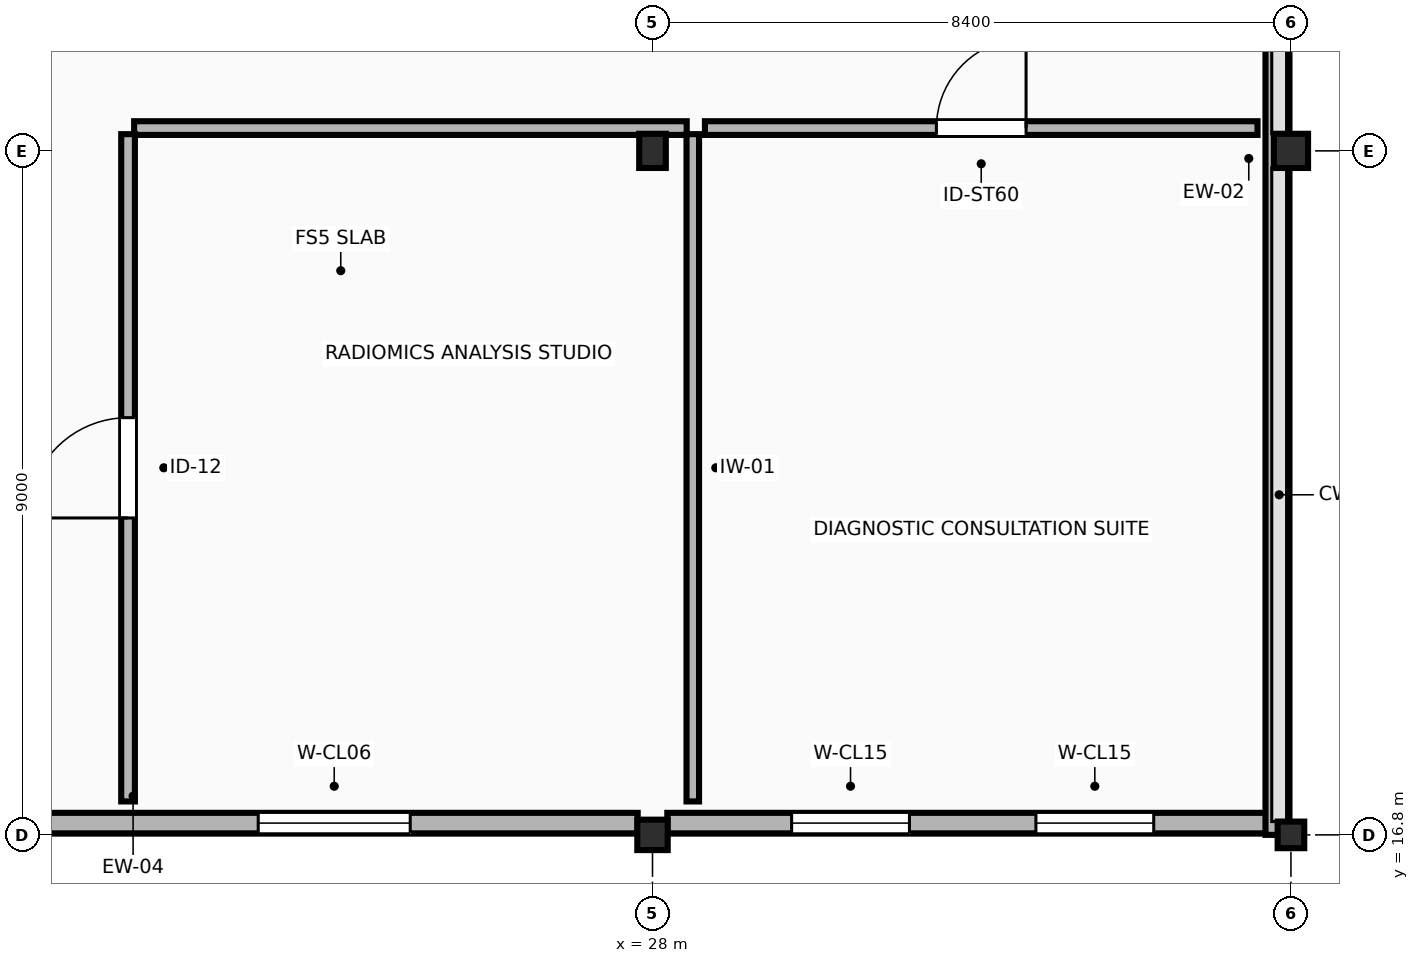
"""IFC4 building model, lengths in metres.
Left out: names, types, materials, properties, quantities, classifications, styles, units other than length and angle.
Written with IfcOpenShell. Run it as: python <this file> out.ifc"""

import sys

from ifc_helpers import new_model, si_unit, direction, frame, frame_2d, origin, origin_2d, place, context, subcontext, project, spatial, polyline, rectangle, outline, extrude, element, fill, save


model = new_model("IFC4")
c1 = context("Model", 3, precision=1e-05, world=origin(), true_north=direction((0.0, 1.0)))
c2 = subcontext(c1, "Body", "Model", "MODEL_VIEW")
j1 = project(units=[si_unit("LENGTHUNIT", "METRE"), si_unit("PLANEANGLEUNIT", "RADIAN")], contexts=[c1])
p1 = place(None, origin())
s1 = spatial("IfcSite", under=j1, at=p1, CompositionType="ELEMENT")
p2 = place(p1, origin())
s2 = spatial("IfcBuilding", under=s1, at=p2, CompositionType="ELEMENT")
p3 = place(p2, frame((0.0, 0.0, 22.2)))
s3 = spatial("IfcBuildingStorey", under=s2, at=p3, CompositionType="ELEMENT", Elevation=22.2)
p4 = place(p3, frame((28.0, 16.8, 0.0), z_axis=(0.0, 0.0, 1.0), x_axis=(1.0, 0.0, 0.0)))
e1 = element("IfcColumn", 1, at=p4, inside=s3, PredefinedType="COLUMN", context=c2, shape_type="SweptSolid", body=[
    extrude(rectangle(XDim=0.4, YDim=0.4, at=origin_2d()), origin(), (0.0, 0.0, 1.0), 4.2),
])
p5 = place(p3, frame((28.0, 25.8, 0.0), z_axis=(0.0, 0.0, 1.0), x_axis=(1.0, 0.0, 0.0)))
e2 = element("IfcColumn", 2, at=p5, inside=s3, PredefinedType="COLUMN", context=c2, shape_type="SweptSolid", body=[
    extrude(rectangle(XDim=0.35, YDim=0.45, at=origin_2d()), origin(), (0.0, 0.0, 1.0), 4.2),
])
p6 = place(p3, frame((36.4, 16.8, 0.0), z_axis=(0.0, 0.0, 1.0), x_axis=(1.0, 0.0, 0.0)))
e3 = element("IfcColumn", 3, at=p6, inside=s3, PredefinedType="COLUMN", context=c2, shape_type="SweptSolid", body=[
    extrude(rectangle(XDim=0.35, YDim=0.35, at=origin_2d()), origin(), (0.0, 0.0, 1.0), 4.2),
])
p7 = place(p3, frame((36.4, 25.8, 0.0), z_axis=(0.0, 0.0, 1.0), x_axis=(1.0, 0.0, 0.0)))
e4 = element("IfcColumn", 4, at=p7, inside=s3, PredefinedType="COLUMN", context=c2, shape_type="SweptSolid", body=[
    extrude(rectangle(XDim=0.45, YDim=0.45, at=origin_2d()), origin(), (0.0, 0.0, 1.0), 4.2),
])
p8 = place(p3, frame((19.82, 16.955, 0.0), z_axis=(0.0, 0.0, 1.0), x_axis=(1.0, 0.0, 0.0)))
e5 = element("IfcWall", 5, at=p8, inside=s3, PredefinedType="STANDARD", context=c2, shape_type="SweptSolid", body=[
    extrude(rectangle(XDim=7.985, YDim=0.27, at=frame_2d((3.992, 0.0))), origin(), (0.0, 0.0, 1.0), 3.92),
])
p9 = place(p8, frame((2.992, 0.0, 0.95)))
e6 = element("IfcOpeningElement", 6, at=p9, cuts=e5, PredefinedType="OPENING", context=c2, shape_type="SweptSolid", body=[
    extrude(rectangle(XDim=2.0, YDim=1.6, at=frame_2d((1.0, 0.8))), frame((0.0, 0.145, 0.0), z_axis=(0.0, -1.0, 0.0), x_axis=(1.0, 0.0, 0.0)), (0.0, 0.0, 1.0), 0.29),
])
p10 = place(p3, frame((28.195, 16.955, 0.0), z_axis=(0.0, 0.0, 1.0), x_axis=(1.0, 0.0, 0.0)))
e7 = element("IfcWall", 7, at=p10, inside=s3, PredefinedType="STANDARD", context=c2, shape_type="SweptSolid", body=[
    extrude(rectangle(XDim=8.035, YDim=0.27, at=frame_2d((4.018, 0.0))), origin(), (0.0, 0.0, 1.0), 3.92),
])
p11 = place(p10, frame((1.635, 0.0, 0.95)))
e8 = element("IfcOpeningElement", 8, at=p11, cuts=e7, PredefinedType="OPENING", context=c2, shape_type="SweptSolid", body=[
    extrude(rectangle(XDim=1.55, YDim=1.45, at=frame_2d((0.775, 0.725))), frame((0.0, 0.145, 0.0), z_axis=(0.0, -1.0, 0.0), x_axis=(1.0, 0.0, 0.0)), (0.0, 0.0, 1.0), 0.29),
])
p12 = place(p10, frame((4.85, 0.0, 0.95)))
e9 = element("IfcOpeningElement", 9, at=p12, cuts=e7, PredefinedType="OPENING", context=c2, shape_type="SweptSolid", body=[
    extrude(rectangle(XDim=1.55, YDim=1.45, at=frame_2d((0.775, 0.725))), frame((0.0, 0.145, 0.0), z_axis=(0.0, -1.0, 0.0), x_axis=(1.0, 0.0, 0.0)), (0.0, 0.0, 1.0), 0.29),
])
p13 = place(p3, frame((36.22, 16.8, 4.2), z_axis=(0.0, 0.0, 1.0), x_axis=(0.0, 1.0, 0.0)))
e10 = element("IfcWall", 10, at=p13, inside=s3, PredefinedType="STANDARD", context=c2, shape_type="SweptSolid", body=[
    extrude(outline(polyline([(0.0, 0.0), (17.8, 0.0), (17.8, 0.0), (9.0, 3.7), (0.0, 0.0), (0.0, 0.0)])), frame((0.0, 0.155, 0.0), z_axis=(0.0, -1.0, 0.0), x_axis=(1.0, 0.0, 0.0)), (0.0, 0.0, 1.0), 0.31),
])
p14 = place(p3, frame((21.18, 26.1, 0.0), z_axis=(0.0, 0.0, 1.0), x_axis=(1.0, 0.0, 0.0)))
e11 = element("IfcWall", 11, at=p14, inside=s3, PredefinedType="PARTITIONING", context=c2, shape_type="SweptSolid", body=[
    extrude(rectangle(XDim=7.27, YDim=0.18, at=frame_2d((3.635, 0.0))), origin(), (0.0, 0.0, 1.0), 3.92),
])
p15 = place(p3, frame((28.53, 26.02, 0.0), z_axis=(0.0, 0.0, 1.0), x_axis=(0.0, -1.0, 0.0)))
e12 = element("IfcWall", 12, at=p15, inside=s3, PredefinedType="PARTITIONING", context=c2, shape_type="SweptSolid", body=[
    extrude(rectangle(XDim=8.78, YDim=0.165, at=frame_2d((4.39, 0.0))), origin(), (0.0, 0.0, 1.0), 3.92),
])
p16 = place(p3, frame((21.1, 17.24, 0.0), z_axis=(0.0, 0.0, 1.0), x_axis=(0.0, 1.0, 0.0)))
e13 = element("IfcWall", 13, at=p16, inside=s3, PredefinedType="PARTITIONING", context=c2, shape_type="SweptSolid", body=[
    extrude(rectangle(XDim=8.78, YDim=0.18, at=frame_2d((4.39, 0.0))), origin(), (0.0, 0.0, 1.0), 3.92),
])
p17 = place(p16, frame((3.73, 0.0, 0.0)))
e14 = element("IfcOpeningElement", 14, at=p17, cuts=e13, PredefinedType="OPENING", context=c2, shape_type="SweptSolid", body=[
    extrude(rectangle(XDim=1.32, YDim=2.22, at=frame_2d((0.66, 1.11))), frame((0.0, 0.1, 0.0), z_axis=(0.0, -1.0, 0.0), x_axis=(1.0, 0.0, 0.0)), (0.0, 0.0, 1.0), 0.2),
])
p18 = place(p3, frame((28.69, 26.1, 0.0), z_axis=(0.0, 0.0, 1.0), x_axis=(1.0, 0.0, 0.0)))
e15 = element("IfcWall", 15, at=p18, inside=s3, PredefinedType="PARTITIONING", context=c2, shape_type="SweptSolid", body=[
    extrude(rectangle(XDim=7.27, YDim=0.18, at=frame_2d((3.635, 0.0))), origin(), (0.0, 0.0, 1.0), 3.92),
])
p19 = place(p18, frame((3.045, 0.0, 0.0)))
e16 = element("IfcOpeningElement", 16, at=p19, cuts=e15, PredefinedType="OPENING", context=c2, shape_type="SweptSolid", body=[
    extrude(rectangle(XDim=1.18, YDim=2.18, at=frame_2d((0.59, 1.09))), frame((0.0, 0.1, 0.0), z_axis=(0.0, -1.0, 0.0), x_axis=(1.0, 0.0, 0.0)), (0.0, 0.0, 1.0), 0.2),
])
p20 = place(p9, origin())
e17 = element("IfcWindow", 17, at=p20, inside=s3, PartitioningType="SINGLE_PANEL", PredefinedType="WINDOW", context=c2, shape_type="SweptSolid", body=[
    extrude(rectangle(XDim=2.0, YDim=1.6, at=frame_2d((1.0, 0.8))), frame((0.0, 0.03, 0.0), z_axis=(0.0, -1.0, 0.0), x_axis=(1.0, 0.0, 0.0)), (0.0, 0.0, 1.0), 0.06),
])
fill(e6, e17)
p21 = place(p11, origin())
e18 = element("IfcWindow", 18, at=p21, inside=s3, PartitioningType="SINGLE_PANEL", PredefinedType="WINDOW", context=c2, shape_type="SweptSolid", body=[
    extrude(rectangle(XDim=1.55, YDim=1.45, at=frame_2d((0.775, 0.725))), frame((0.0, 0.03, 0.0), z_axis=(0.0, -1.0, 0.0), x_axis=(1.0, 0.0, 0.0)), (0.0, 0.0, 1.0), 0.06),
])
fill(e8, e18)
p22 = place(p12, origin())
e19 = element("IfcWindow", 19, at=p22, inside=s3, PartitioningType="SINGLE_PANEL", PredefinedType="WINDOW", context=c2, shape_type="SweptSolid", body=[
    extrude(rectangle(XDim=1.55, YDim=1.45, at=frame_2d((0.775, 0.725))), frame((0.0, 0.03, 0.0), z_axis=(0.0, -1.0, 0.0), x_axis=(1.0, 0.0, 0.0)), (0.0, 0.0, 1.0), 0.06),
])
fill(e9, e19)
p23 = place(p17, origin())
e20 = element("IfcDoor", 20, at=p23, inside=s3, OperationType="SINGLE_SWING_LEFT", PredefinedType="DOOR", context=c2, shape_type="SweptSolid", body=[
    extrude(rectangle(XDim=1.32, YDim=2.22, at=frame_2d((0.66, 1.11))), frame((0.0, 0.025, 0.0), z_axis=(0.0, -1.0, 0.0), x_axis=(1.0, 0.0, 0.0)), (0.0, 0.0, 1.0), 0.05),
])
fill(e14, e20)
p24 = place(p19, origin())
e21 = element("IfcDoor", 21, at=p24, inside=s3, OperationType="SINGLE_SWING_RIGHT", PredefinedType="DOOR", context=c2, shape_type="SweptSolid", body=[
    extrude(rectangle(XDim=1.18, YDim=2.18, at=frame_2d((0.59, 1.09))), frame((0.0, 0.025, 0.0), z_axis=(0.0, -1.0, 0.0), x_axis=(1.0, 0.0, 0.0)), (0.0, 0.0, 1.0), 0.05),
])
fill(e16, e21)
save(model, sys.argv[1])
